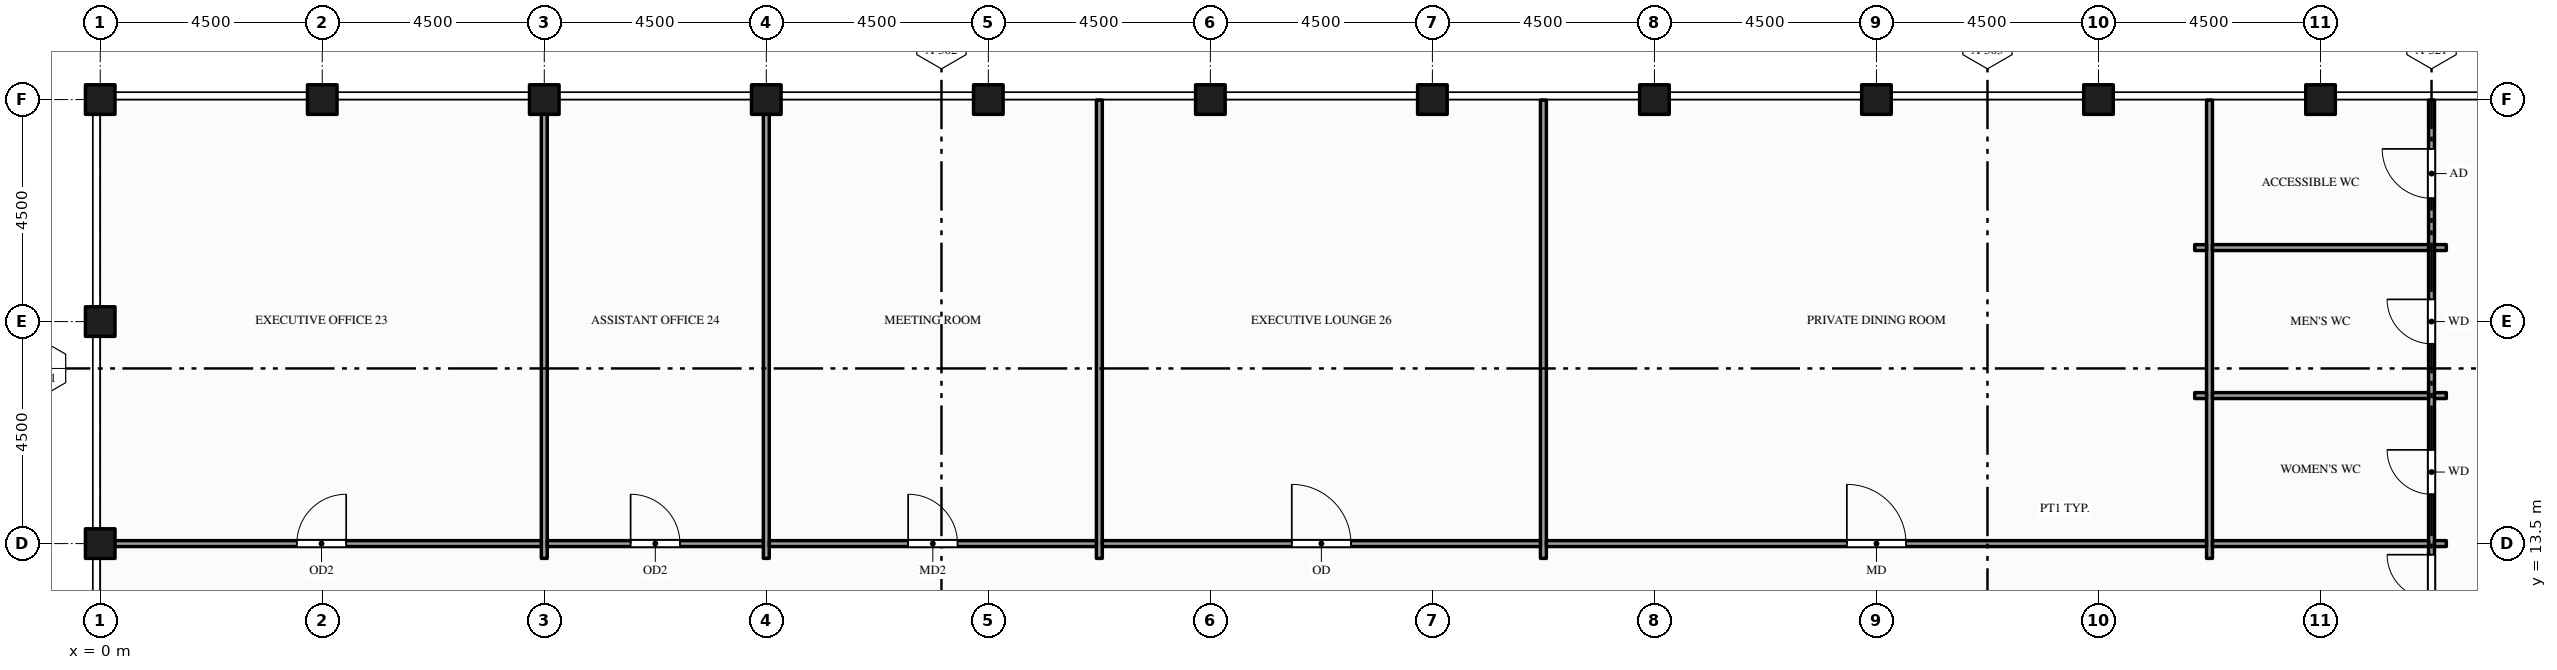
"""IFC4 building model, lengths in metres.
Left out: names, types, materials, properties, quantities, classifications, styles, units other than length and angle.
Written with IfcOpenShell. Run it as: python <this file> out.ifc"""

import sys

from ifc_helpers import new_model, si_unit, direction, frame, frame_2d, origin, origin_2d, place, context, subcontext, project, spatial, rectangle, hollow_rectangle, extrude, element, fill, save


model = new_model("IFC4")
c1 = context("Model", 3, precision=1e-05, world=origin(), true_north=direction((0.0, 1.0)))
c2 = subcontext(c1, "Body", "Model", "MODEL_VIEW")
j1 = project(units=[si_unit("LENGTHUNIT", "METRE"), si_unit("PLANEANGLEUNIT", "RADIAN")], contexts=[c1])
p1 = place(None, origin())
s1 = spatial("IfcSite", under=j1, at=p1, CompositionType="ELEMENT")
p2 = place(p1, origin())
s2 = spatial("IfcBuilding", under=s1, at=p2, CompositionType="ELEMENT")
p3 = place(p2, frame((0.0, 0.0, 318.5)))
s3 = spatial("IfcBuildingStorey", under=s2, at=p3, CompositionType="ELEMENT", Elevation=318.5)
for number, where, z_axis, x_axis in (
    (1, (0.0, 13.5, -0.15), (0.0, 0.0, 1.0), (1.0, 0.0, 0.0)),
    (2, (0.0, 18.0, -0.15), (0.0, 0.0, 1.0), (1.0, 0.0, 0.0)),
    (3, (0.0, 22.5, -0.15), (0.0, 0.0, 1.0), (1.0, 0.0, 0.0)),
    (4, (4.5, 22.5, -0.15), (0.0, 0.0, 1.0), (1.0, 0.0, 0.0)),
    (5, (9.0, 22.5, -0.15), (0.0, 0.0, 1.0), (1.0, 0.0, 0.0)),
    (6, (13.5, 22.5, -0.15), (0.0, 0.0, 1.0), (1.0, 0.0, 0.0)),
    (7, (18.0, 22.5, -0.15), (0.0, 0.0, 1.0), (1.0, 0.0, 0.0)),
    (8, (22.5, 22.5, -0.15), (0.0, 0.0, 1.0), (1.0, 0.0, 0.0)),
    (9, (27.0, 22.5, -0.15), (0.0, 0.0, 1.0), (1.0, 0.0, 0.0)),
    (10, (31.5, 22.5, -0.15), (0.0, 0.0, 1.0), (1.0, 0.0, 0.0)),
    (11, (36.0, 22.5, -0.15), (0.0, 0.0, 1.0), (1.0, 0.0, 0.0)),
    (12, (40.5, 22.5, -0.15), (0.0, 0.0, 1.0), (1.0, 0.0, 0.0)),
    (13, (45.0, 22.5, -0.15), (0.0, 0.0, 1.0), (1.0, 0.0, 0.0)),
):
    element("IfcColumn", number, at=place(p3, frame(where, z_axis=z_axis, x_axis=x_axis)), inside=s3, PredefinedType="COLUMN", context=c2, shape_type="SweptSolid", body=[
        extrude(hollow_rectangle(XDim=0.6, YDim=0.6, WallThickness=0.03, at=origin_2d()), origin(), (0.0, 0.0, 1.0), 4.5),
    ])
for number, where, z_axis, x_axis in (
    (14, (9.0, 13.2, 0.0), (0.0, 0.0, 1.0), (0.0, 1.0, 0.0)),
    (15, (13.5, 13.2, 0.0), (0.0, 0.0, 1.0), (0.0, 1.0, 0.0)),
    (16, (20.25, 13.2, 0.0), (0.0, 0.0, 1.0), (0.0, 1.0, 0.0)),
    (17, (29.25, 13.2, 0.0), (0.0, 0.0, 1.0), (0.0, 1.0, 0.0)),
    (18, (42.75, 13.2, 0.0), (0.0, 0.0, 1.0), (0.0, 1.0, 0.0)),
):
    element("IfcWall", number, at=place(p3, frame(where, z_axis=z_axis, x_axis=x_axis)), inside=s3, PredefinedType="PARTITIONING", context=c2, shape_type="SweptSolid", body=[
        extrude(rectangle(XDim=9.29, YDim=0.12, at=frame_2d((4.645, 0.0))), origin(), (0.0, 0.0, 1.0), 3.359),
    ])
p4 = place(p3, frame((47.25, 0.01, 0.0), z_axis=(0.0, 0.0, 1.0), x_axis=(0.0, 1.0, 0.0)))
e19 = element("IfcWall", 19, at=p4, inside=s3, PredefinedType="PARTITIONING", context=c2, shape_type="SweptSolid", body=[
    extrude(rectangle(XDim=22.48, YDim=0.12, at=frame_2d((11.24, 0.0))), origin(), (0.0, 0.0, 1.0), 3.359),
])
p5 = place(p4, frame((11.465, 0.0, 0.0)))
e20 = element("IfcOpeningElement", 20, at=p5, cuts=e19, PredefinedType="OPENING", context=c2, shape_type="SweptSolid", body=[
    extrude(rectangle(XDim=1.8, YDim=2.1, at=frame_2d((0.9, 1.05))), frame((0.0, 0.07, 0.0), z_axis=(0.0, -1.0, 0.0), x_axis=(1.0, 0.0, 0.0)), (0.0, 0.0, 1.0), 0.14),
])
p6 = place(p4, frame((14.49, 0.0, 0.0)))
e21 = element("IfcOpeningElement", 21, at=p6, cuts=e19, PredefinedType="OPENING", context=c2, shape_type="SweptSolid", body=[
    extrude(rectangle(XDim=0.9, YDim=2.1, at=frame_2d((0.45, 1.05))), frame((0.0, 0.07, 0.0), z_axis=(0.0, -1.0, 0.0), x_axis=(1.0, 0.0, 0.0)), (0.0, 0.0, 1.0), 0.14),
])
p7 = place(p4, frame((17.54, 0.0, 0.0)))
e22 = element("IfcOpeningElement", 22, at=p7, cuts=e19, PredefinedType="OPENING", context=c2, shape_type="SweptSolid", body=[
    extrude(rectangle(XDim=0.9, YDim=2.1, at=frame_2d((0.45, 1.05))), frame((0.0, 0.07, 0.0), z_axis=(0.0, -1.0, 0.0), x_axis=(1.0, 0.0, 0.0)), (0.0, 0.0, 1.0), 0.14),
])
p8 = place(p4, frame((20.49, 0.0, 0.0)))
e23 = element("IfcOpeningElement", 23, at=p8, cuts=e19, PredefinedType="OPENING", context=c2, shape_type="SweptSolid", body=[
    extrude(rectangle(XDim=1.0, YDim=2.1, at=frame_2d((0.5, 1.05))), frame((0.0, 0.07, 0.0), z_axis=(0.0, -1.0, 0.0), x_axis=(1.0, 0.0, 0.0)), (0.0, 0.0, 1.0), 0.14),
])
p9 = place(p3, frame((0.01, 13.5, 0.0), z_axis=(0.0, 0.0, 1.0), x_axis=(1.0, 0.0, 0.0)))
e24 = element("IfcWall", 24, at=p9, inside=s3, PredefinedType="PARTITIONING", context=c2, shape_type="SweptSolid", body=[
    extrude(rectangle(XDim=8.93, YDim=0.12, at=frame_2d((4.465, 0.0))), origin(), (0.0, 0.0, 1.0), 3.359),
])
p10 = place(p9, frame((3.975, 0.0, 0.0)))
e25 = element("IfcOpeningElement", 25, at=p10, cuts=e24, PredefinedType="OPENING", context=c2, shape_type="SweptSolid", body=[
    extrude(rectangle(XDim=1.0, YDim=2.1, at=frame_2d((0.5, 1.05))), frame((0.0, 0.07, 0.0), z_axis=(0.0, -1.0, 0.0), x_axis=(1.0, 0.0, 0.0)), (0.0, 0.0, 1.0), 0.14),
])
p11 = place(p3, frame((9.06, 13.5, 0.0), z_axis=(0.0, 0.0, 1.0), x_axis=(1.0, 0.0, 0.0)))
e26 = element("IfcWall", 26, at=p11, inside=s3, PredefinedType="PARTITIONING", context=c2, shape_type="SweptSolid", body=[
    extrude(rectangle(XDim=4.38, YDim=0.12, at=frame_2d((2.19, 0.0))), origin(), (0.0, 0.0, 1.0), 3.359),
])
p12 = place(p11, frame((1.69, 0.0, 0.0)))
e27 = element("IfcOpeningElement", 27, at=p12, cuts=e26, PredefinedType="OPENING", context=c2, shape_type="SweptSolid", body=[
    extrude(rectangle(XDim=1.0, YDim=2.1, at=frame_2d((0.5, 1.05))), frame((0.0, 0.07, 0.0), z_axis=(0.0, -1.0, 0.0), x_axis=(1.0, 0.0, 0.0)), (0.0, 0.0, 1.0), 0.14),
])
p13 = place(p3, frame((13.56, 13.5, 0.0), z_axis=(0.0, 0.0, 1.0), x_axis=(1.0, 0.0, 0.0)))
e28 = element("IfcWall", 28, at=p13, inside=s3, PredefinedType="PARTITIONING", context=c2, shape_type="SweptSolid", body=[
    extrude(rectangle(XDim=6.63, YDim=0.12, at=frame_2d((3.315, 0.0))), origin(), (0.0, 0.0, 1.0), 3.359),
])
p14 = place(p13, frame((2.815, 0.0, 0.0)))
e29 = element("IfcOpeningElement", 29, at=p14, cuts=e28, PredefinedType="OPENING", context=c2, shape_type="SweptSolid", body=[
    extrude(rectangle(XDim=1.0, YDim=2.1, at=frame_2d((0.5, 1.05))), frame((0.0, 0.07, 0.0), z_axis=(0.0, -1.0, 0.0), x_axis=(1.0, 0.0, 0.0)), (0.0, 0.0, 1.0), 0.14),
])
p15 = place(p3, frame((20.31, 13.5, 0.0), z_axis=(0.0, 0.0, 1.0), x_axis=(1.0, 0.0, 0.0)))
e30 = element("IfcWall", 30, at=p15, inside=s3, PredefinedType="PARTITIONING", context=c2, shape_type="SweptSolid", body=[
    extrude(rectangle(XDim=8.88, YDim=0.12, at=frame_2d((4.44, 0.0))), origin(), (0.0, 0.0, 1.0), 3.359),
])
p16 = place(p15, frame((3.84, 0.0, 0.0)))
e31 = element("IfcOpeningElement", 31, at=p16, cuts=e30, PredefinedType="OPENING", context=c2, shape_type="SweptSolid", body=[
    extrude(rectangle(XDim=1.2, YDim=2.1, at=frame_2d((0.6, 1.05))), frame((0.0, 0.07, 0.0), z_axis=(0.0, -1.0, 0.0), x_axis=(1.0, 0.0, 0.0)), (0.0, 0.0, 1.0), 0.14),
])
p17 = place(p3, frame((29.31, 13.5, 0.0), z_axis=(0.0, 0.0, 1.0), x_axis=(1.0, 0.0, 0.0)))
e32 = element("IfcWall", 32, at=p17, inside=s3, PredefinedType="PARTITIONING", context=c2, shape_type="SweptSolid", body=[
    extrude(rectangle(XDim=13.38, YDim=0.12, at=frame_2d((6.69, 0.0))), origin(), (0.0, 0.0, 1.0), 3.359),
])
p18 = place(p17, frame((6.09, 0.0, 0.0)))
e33 = element("IfcOpeningElement", 33, at=p18, cuts=e32, PredefinedType="OPENING", context=c2, shape_type="SweptSolid", body=[
    extrude(rectangle(XDim=1.2, YDim=2.1, at=frame_2d((0.6, 1.05))), frame((0.0, 0.07, 0.0), z_axis=(0.0, -1.0, 0.0), x_axis=(1.0, 0.0, 0.0)), (0.0, 0.0, 1.0), 0.14),
])
p19 = place(p3, frame((42.81, 13.5, 0.0), z_axis=(0.0, 0.0, 1.0), x_axis=(1.0, 0.0, 0.0)))
e34 = element("IfcWall", 34, at=p19, inside=s3, PredefinedType="PARTITIONING", context=c2, shape_type="SweptSolid", body=[
    extrude(rectangle(XDim=4.38, YDim=0.12, at=frame_2d((2.19, 0.0))), origin(), (0.0, 0.0, 1.0), 3.359),
])
for number, where, z_axis, x_axis in (
    (35, (47.31, 13.5, 0.0), (0.0, 0.0, 1.0), (1.0, 0.0, 0.0)),
    (36, (42.45, 16.5, 0.0), (0.0, 0.0, 1.0), (1.0, 0.0, 0.0)),
):
    element("IfcWall", number, at=place(p3, frame(where, z_axis=z_axis, x_axis=x_axis)), inside=s3, PredefinedType="PARTITIONING", context=c2, shape_type="SweptSolid", body=[
        extrude(rectangle(XDim=0.24, YDim=0.12, at=frame_2d((0.12, 0.0))), origin(), (0.0, 0.0, 1.0), 3.359),
    ])
p20 = place(p3, frame((42.81, 16.5, 0.0), z_axis=(0.0, 0.0, 1.0), x_axis=(1.0, 0.0, 0.0)))
e37 = element("IfcWall", 37, at=p20, inside=s3, PredefinedType="PARTITIONING", context=c2, shape_type="SweptSolid", body=[
    extrude(rectangle(XDim=4.38, YDim=0.12, at=frame_2d((2.19, 0.0))), origin(), (0.0, 0.0, 1.0), 3.359),
])
for number, where, z_axis, x_axis in (
    (38, (47.31, 16.5, 0.0), (0.0, 0.0, 1.0), (1.0, 0.0, 0.0)),
    (39, (42.45, 19.5, 0.0), (0.0, 0.0, 1.0), (1.0, 0.0, 0.0)),
):
    element("IfcWall", number, at=place(p3, frame(where, z_axis=z_axis, x_axis=x_axis)), inside=s3, PredefinedType="PARTITIONING", context=c2, shape_type="SweptSolid", body=[
        extrude(rectangle(XDim=0.24, YDim=0.12, at=frame_2d((0.12, 0.0))), origin(), (0.0, 0.0, 1.0), 3.359),
    ])
p21 = place(p3, frame((42.81, 19.5, 0.0), z_axis=(0.0, 0.0, 1.0), x_axis=(1.0, 0.0, 0.0)))
e40 = element("IfcWall", 40, at=p21, inside=s3, PredefinedType="PARTITIONING", context=c2, shape_type="SweptSolid", body=[
    extrude(rectangle(XDim=4.38, YDim=0.12, at=frame_2d((2.19, 0.0))), origin(), (0.0, 0.0, 1.0), 3.359),
])
p22 = place(p3, frame((47.31, 19.5, 0.0), z_axis=(0.0, 0.0, 1.0), x_axis=(1.0, 0.0, 0.0)))
e41 = element("IfcWall", 41, at=p22, inside=s3, PredefinedType="PARTITIONING", context=c2, shape_type="SweptSolid", body=[
    extrude(rectangle(XDim=0.24, YDim=0.12, at=frame_2d((0.12, 0.0))), origin(), (0.0, 0.0, 1.0), 3.359),
])
p23 = place(p5, origin())
e42 = element("IfcDoor", 42, at=p23, inside=s3, OperationType="DOUBLE_DOOR_SINGLE_SWING", PredefinedType="DOOR", context=c2, shape_type="SweptSolid", body=[
    extrude(rectangle(XDim=1.8, YDim=2.1, at=frame_2d((0.9, 1.05))), frame((0.0, 0.025, 0.0), z_axis=(0.0, -1.0, 0.0), x_axis=(1.0, 0.0, 0.0)), (0.0, 0.0, 1.0), 0.05),
])
fill(e20, e42)
p24 = place(p10, origin())
e43 = element("IfcDoor", 43, at=p24, inside=s3, OperationType="SINGLE_SWING_RIGHT", PredefinedType="DOOR", context=c2, shape_type="SweptSolid", body=[
    extrude(rectangle(XDim=1.0, YDim=2.1, at=frame_2d((0.5, 1.05))), frame((0.0, 0.025, 0.0), z_axis=(0.0, -1.0, 0.0), x_axis=(1.0, 0.0, 0.0)), (0.0, 0.0, 1.0), 0.05),
])
fill(e25, e43)
p25 = place(p12, origin())
e44 = element("IfcDoor", 44, at=p25, inside=s3, OperationType="SINGLE_SWING_LEFT", PredefinedType="DOOR", context=c2, shape_type="SweptSolid", body=[
    extrude(rectangle(XDim=1.0, YDim=2.1, at=frame_2d((0.5, 1.05))), frame((0.0, 0.025, 0.0), z_axis=(0.0, -1.0, 0.0), x_axis=(1.0, 0.0, 0.0)), (0.0, 0.0, 1.0), 0.05),
])
fill(e27, e44)
p26 = place(p14, origin())
e45 = element("IfcDoor", 45, at=p26, inside=s3, OperationType="SINGLE_SWING_LEFT", PredefinedType="DOOR", context=c2, shape_type="SweptSolid", body=[
    extrude(rectangle(XDim=1.0, YDim=2.1, at=frame_2d((0.5, 1.05))), frame((0.0, 0.025, 0.0), z_axis=(0.0, -1.0, 0.0), x_axis=(1.0, 0.0, 0.0)), (0.0, 0.0, 1.0), 0.05),
])
fill(e29, e45)
p27 = place(p16, origin())
e46 = element("IfcDoor", 46, at=p27, inside=s3, OperationType="SINGLE_SWING_LEFT", PredefinedType="DOOR", context=c2, shape_type="SweptSolid", body=[
    extrude(rectangle(XDim=1.2, YDim=2.1, at=frame_2d((0.6, 1.05))), frame((0.0, 0.025, 0.0), z_axis=(0.0, -1.0, 0.0), x_axis=(1.0, 0.0, 0.0)), (0.0, 0.0, 1.0), 0.05),
])
fill(e31, e46)
p28 = place(p18, origin())
e47 = element("IfcDoor", 47, at=p28, inside=s3, OperationType="SINGLE_SWING_LEFT", PredefinedType="DOOR", context=c2, shape_type="SweptSolid", body=[
    extrude(rectangle(XDim=1.2, YDim=2.1, at=frame_2d((0.6, 1.05))), frame((0.0, 0.025, 0.0), z_axis=(0.0, -1.0, 0.0), x_axis=(1.0, 0.0, 0.0)), (0.0, 0.0, 1.0), 0.05),
])
fill(e33, e47)
p29 = place(p6, origin())
e48 = element("IfcDoor", 48, at=p29, inside=s3, OperationType="SINGLE_SWING_RIGHT", PredefinedType="DOOR", context=c2, shape_type="SweptSolid", body=[
    extrude(rectangle(XDim=0.9, YDim=2.1, at=frame_2d((0.45, 1.05))), frame((0.0, 0.025, 0.0), z_axis=(0.0, -1.0, 0.0), x_axis=(1.0, 0.0, 0.0)), (0.0, 0.0, 1.0), 0.05),
])
fill(e21, e48)
p30 = place(p7, origin())
e49 = element("IfcDoor", 49, at=p30, inside=s3, OperationType="SINGLE_SWING_RIGHT", PredefinedType="DOOR", context=c2, shape_type="SweptSolid", body=[
    extrude(rectangle(XDim=0.9, YDim=2.1, at=frame_2d((0.45, 1.05))), frame((0.0, 0.025, 0.0), z_axis=(0.0, -1.0, 0.0), x_axis=(1.0, 0.0, 0.0)), (0.0, 0.0, 1.0), 0.05),
])
fill(e22, e49)
p31 = place(p8, origin())
e50 = element("IfcDoor", 50, at=p31, inside=s3, OperationType="SINGLE_SWING_RIGHT", PredefinedType="DOOR", context=c2, shape_type="SweptSolid", body=[
    extrude(rectangle(XDim=1.0, YDim=2.1, at=frame_2d((0.5, 1.05))), frame((0.0, 0.025, 0.0), z_axis=(0.0, -1.0, 0.0), x_axis=(1.0, 0.0, 0.0)), (0.0, 0.0, 1.0), 0.05),
])
fill(e23, e50)
save(model, sys.argv[1])
